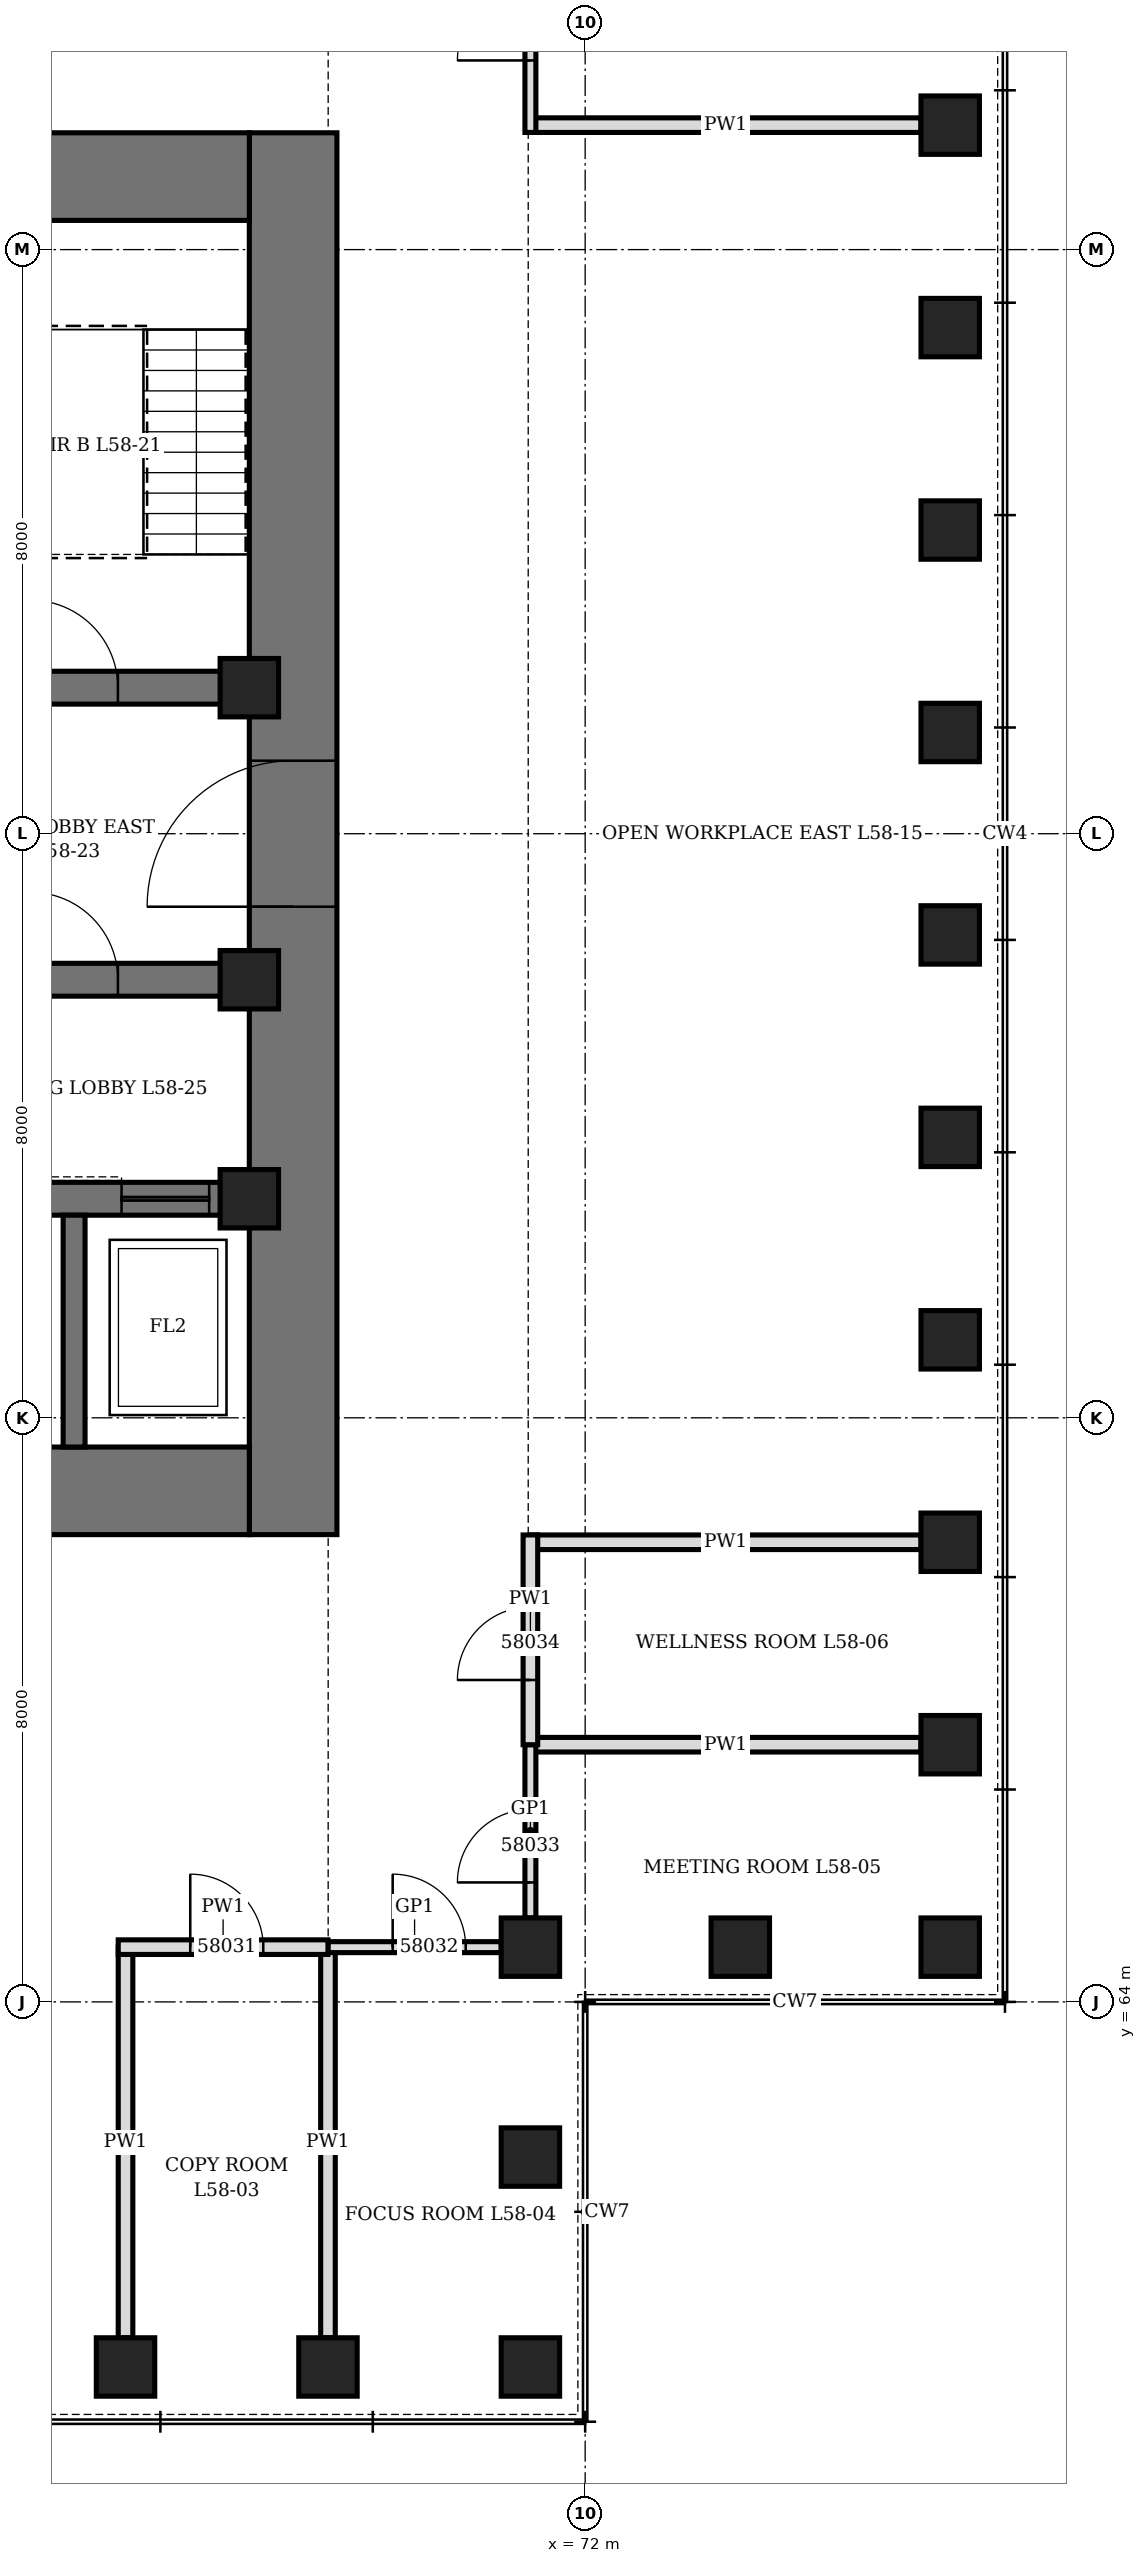
"""IFC4 building model, lengths in metres.
Left out: names, types, materials, properties, quantities, classifications, styles, units other than length and angle.
Written with IfcOpenShell. Run it as: python <this file> out.ifc"""

import sys

from ifc_helpers import new_model, si_unit, direction, frame, frame_2d, origin, origin_2d, place, context, subcontext, project, spatial, rectangle, hollow_rectangle, extrude, element, fill, save


model = new_model("IFC4")
c1 = context("Model", 3, precision=1e-05, world=origin(), true_north=direction((0.0, 1.0)))
c2 = subcontext(c1, "Body", "Model", "MODEL_VIEW")
j1 = project(units=[si_unit("LENGTHUNIT", "METRE"), si_unit("PLANEANGLEUNIT", "RADIAN")], contexts=[c1])
p1 = place(None, origin())
s1 = spatial("IfcSite", under=j1, at=p1, CompositionType="ELEMENT")
p2 = place(p1, origin())
s2 = spatial("IfcBuilding", under=s1, at=p2, CompositionType="ELEMENT")
p3 = place(p2, frame((0.0, 0.0, 258.7)))
s3 = spatial("IfcBuildingStorey", under=s2, at=p3, CompositionType="ELEMENT", Elevation=258.7)
for number, where, z_axis, x_axis in (
    (1, (65.705, 59.0, 0.0), (0.0, 0.0, 1.0), (1.0, 0.0, 0.0)),
    (2, (68.477, 59.0, 0.0), (0.0, 0.0, 1.0), (1.0, 0.0, 0.0)),
    (3, (71.25, 59.0, 0.0), (0.0, 0.0, 1.0), (0.0, 1.0, 0.0)),
    (4, (71.25, 61.875, 0.0), (0.0, 0.0, 1.0), (0.0, 1.0, 0.0)),
    (5, (71.25, 64.75, 0.0), (0.0, 0.0, 1.0), (1.0, 0.0, 0.0)),
    (6, (74.125, 64.75, 0.0), (0.0, 0.0, 1.0), (1.0, 0.0, 0.0)),
    (7, (77.0, 64.75, 0.0), (0.0, 0.0, 1.0), (0.0, 1.0, 0.0)),
    (8, (77.0, 67.523, 0.0), (0.0, 0.0, 1.0), (0.0, 1.0, 0.0)),
    (9, (77.0, 70.295, 0.0), (0.0, 0.0, 1.0), (0.0, 1.0, 0.0)),
    (10, (77.0, 73.068, 0.0), (0.0, 0.0, 1.0), (0.0, 1.0, 0.0)),
    (11, (77.0, 75.841, 0.0), (0.0, 0.0, 1.0), (0.0, 1.0, 0.0)),
    (12, (77.0, 78.614, 0.0), (0.0, 0.0, 1.0), (0.0, 1.0, 0.0)),
    (13, (77.0, 81.386, 0.0), (0.0, 0.0, 1.0), (0.0, 1.0, 0.0)),
    (14, (77.0, 84.159, 0.0), (0.0, 0.0, 1.0), (0.0, 1.0, 0.0)),
    (15, (77.0, 86.932, 0.0), (0.0, 0.0, 1.0), (0.0, 1.0, 0.0)),
    (16, (77.0, 89.705, 0.0), (0.0, 0.0, 1.0), (0.0, 1.0, 0.0)),
):
    element("IfcColumn", number, at=place(p3, frame(where, z_axis=z_axis, x_axis=x_axis)), inside=s3, PredefinedType="COLUMN", context=c2, shape_type="SweptSolid", body=[
        extrude(hollow_rectangle(XDim=0.8, YDim=0.8, WallThickness=0.1, at=origin_2d()), origin(), (0.0, 0.0, 1.0), 4.2),
    ])
p4 = place(p3, frame((68.0, 70.4, 0.0), z_axis=(0.0, 0.0, 1.0), x_axis=(0.0, 1.0, 0.0)))
e17 = element("IfcWall", 17, at=p4, inside=s3, PredefinedType="SHEAR", context=c2, shape_type="SweptSolid", body=[
    extrude(rectangle(XDim=19.2, YDim=1.2, at=frame_2d((9.6, 0.0))), origin(), (0.0, 0.0, 1.0), 4.2),
])
p5 = place(p4, frame((8.6, 0.0, 0.0)))
e18 = element("IfcOpeningElement", 18, at=p5, cuts=e17, PredefinedType="OPENING", context=c2, shape_type="SweptSolid", body=[
    extrude(rectangle(XDim=2.0, YDim=2.4, at=frame_2d((1.0, 1.2))), frame((0.0, 0.61, 0.0), z_axis=(0.0, -1.0, 0.0), x_axis=(1.0, 0.0, 0.0)), (0.0, 0.0, 1.0), 1.22),
])
p6 = place(p3, frame((44.6, 71.0, 0.0), z_axis=(0.0, 0.0, 1.0), x_axis=(1.0, 0.0, 0.0)))
e19 = element("IfcWall", 19, at=p6, inside=s3, PredefinedType="SHEAR", context=c2, shape_type="SweptSolid", body=[
    extrude(rectangle(XDim=22.8, YDim=1.2, at=frame_2d((11.4, 0.0))), origin(), (0.0, 0.0, 1.0), 4.2),
])
p7 = place(p6, frame((6.35, 0.0, 0.0)))
e20 = element("IfcOpeningElement", 20, at=p7, cuts=e19, PredefinedType="OPENING", context=c2, shape_type="SweptSolid", body=[
    extrude(rectangle(XDim=1.1, YDim=2.2, at=frame_2d((0.55, 1.1))), frame((0.0, 0.61, 0.0), z_axis=(0.0, -1.0, 0.0), x_axis=(1.0, 0.0, 0.0)), (0.0, 0.0, 1.0), 1.22),
])
p8 = place(p6, frame((9.35, 0.0, 0.0)))
e21 = element("IfcOpeningElement", 21, at=p8, cuts=e19, PredefinedType="OPENING", context=c2, shape_type="SweptSolid", body=[
    extrude(rectangle(XDim=1.1, YDim=2.2, at=frame_2d((0.55, 1.1))), frame((0.0, 0.61, 0.0), z_axis=(0.0, -1.0, 0.0), x_axis=(1.0, 0.0, 0.0)), (0.0, 0.0, 1.0), 1.22),
])
p9 = place(p6, frame((12.35, 0.0, 0.0)))
e22 = element("IfcOpeningElement", 22, at=p9, cuts=e19, PredefinedType="OPENING", context=c2, shape_type="SweptSolid", body=[
    extrude(rectangle(XDim=1.1, YDim=2.2, at=frame_2d((0.55, 1.1))), frame((0.0, 0.61, 0.0), z_axis=(0.0, -1.0, 0.0), x_axis=(1.0, 0.0, 0.0)), (0.0, 0.0, 1.0), 1.22),
])
p10 = place(p6, frame((15.35, 0.0, 0.0)))
e23 = element("IfcOpeningElement", 23, at=p10, cuts=e19, PredefinedType="OPENING", context=c2, shape_type="SweptSolid", body=[
    extrude(rectangle(XDim=1.1, YDim=2.2, at=frame_2d((0.55, 1.1))), frame((0.0, 0.61, 0.0), z_axis=(0.0, -1.0, 0.0), x_axis=(1.0, 0.0, 0.0)), (0.0, 0.0, 1.0), 1.22),
])
p11 = place(p3, frame((44.6, 89.0, 0.0), z_axis=(0.0, 0.0, 1.0), x_axis=(1.0, 0.0, 0.0)))
e24 = element("IfcWall", 24, at=p11, inside=s3, PredefinedType="SHEAR", context=c2, shape_type="SweptSolid", body=[
    extrude(rectangle(XDim=22.8, YDim=1.2, at=frame_2d((11.4, 0.0))), origin(), (0.0, 0.0, 1.0), 4.2),
])
p12 = place(p11, frame((7.9, 0.0, 0.0)))
e25 = element("IfcOpeningElement", 25, at=p12, cuts=e24, PredefinedType="OPENING", context=c2, shape_type="SweptSolid", body=[
    extrude(rectangle(XDim=1.0, YDim=2.1, at=frame_2d((0.5, 1.05))), frame((0.0, 0.61, 0.0), z_axis=(0.0, -1.0, 0.0), x_axis=(1.0, 0.0, 0.0)), (0.0, 0.0, 1.0), 1.22),
])
p13 = place(p11, frame((12.025, 0.0, 0.0)))
e26 = element("IfcOpeningElement", 26, at=p13, cuts=e24, PredefinedType="OPENING", context=c2, shape_type="SweptSolid", body=[
    extrude(rectangle(XDim=0.9, YDim=2.1, at=frame_2d((0.45, 1.05))), frame((0.0, 0.61, 0.0), z_axis=(0.0, -1.0, 0.0), x_axis=(1.0, 0.0, 0.0)), (0.0, 0.0, 1.0), 1.22),
])
p14 = place(p11, frame((13.962, 0.0, 0.0)))
e27 = element("IfcOpeningElement", 27, at=p14, cuts=e24, PredefinedType="OPENING", context=c2, shape_type="SweptSolid", body=[
    extrude(rectangle(XDim=0.9, YDim=2.1, at=frame_2d((0.45, 1.05))), frame((0.0, 0.61, 0.0), z_axis=(0.0, -1.0, 0.0), x_axis=(1.0, 0.0, 0.0)), (0.0, 0.0, 1.0), 1.22),
])
p15 = place(p3, frame((62.225, 75.0, 0.0), z_axis=(0.0, 0.0, 1.0), x_axis=(1.0, 0.0, 0.0)))
e28 = element("IfcWall", 28, at=p15, inside=s3, PredefinedType="SHEAR", context=c2, shape_type="SweptSolid", body=[
    extrude(rectangle(XDim=5.175, YDim=0.45, at=frame_2d((2.587, 0.0))), origin(), (0.0, 0.0, 1.0), 4.2),
])
p16 = place(p15, frame((0.675, 0.0, 0.0)))
e29 = element("IfcOpeningElement", 29, at=p16, cuts=e28, PredefinedType="OPENING", context=c2, shape_type="SweptSolid", body=[
    extrude(rectangle(XDim=1.2, YDim=2.2, at=frame_2d((0.6, 1.1))), frame((0.0, 0.235, 0.0), z_axis=(0.0, -1.0, 0.0), x_axis=(1.0, 0.0, 0.0)), (0.0, 0.0, 1.0), 0.47),
])
p17 = place(p15, frame((3.425, 0.0, 0.0)))
e30 = element("IfcOpeningElement", 30, at=p17, cuts=e28, PredefinedType="OPENING", context=c2, shape_type="SweptSolid", body=[
    extrude(rectangle(XDim=1.2, YDim=2.2, at=frame_2d((0.6, 1.1))), frame((0.0, 0.235, 0.0), z_axis=(0.0, -1.0, 0.0), x_axis=(1.0, 0.0, 0.0)), (0.0, 0.0, 1.0), 0.47),
])
p18 = place(p3, frame((62.225, 78.0, 0.0), z_axis=(0.0, 0.0, 1.0), x_axis=(1.0, 0.0, 0.0)))
e31 = element("IfcWall", 31, at=p18, inside=s3, PredefinedType="SHEAR", context=c2, shape_type="SweptSolid", body=[
    extrude(rectangle(XDim=5.175, YDim=0.45, at=frame_2d((2.587, 0.0))), origin(), (0.0, 0.0, 1.0), 4.2),
])
p19 = place(p18, frame((2.175, 0.0, 0.0)))
e32 = element("IfcOpeningElement", 32, at=p19, cuts=e31, PredefinedType="OPENING", context=c2, shape_type="SweptSolid", body=[
    extrude(rectangle(XDim=1.2, YDim=2.1, at=frame_2d((0.6, 1.05))), frame((0.0, 0.235, 0.0), z_axis=(0.0, -1.0, 0.0), x_axis=(1.0, 0.0, 0.0)), (0.0, 0.0, 1.0), 0.47),
])
p20 = place(p3, frame((62.225, 82.0, 0.0), z_axis=(0.0, 0.0, 1.0), x_axis=(1.0, 0.0, 0.0)))
e33 = element("IfcWall", 33, at=p20, inside=s3, PredefinedType="SHEAR", context=c2, shape_type="SweptSolid", body=[
    extrude(rectangle(XDim=5.175, YDim=0.45, at=frame_2d((2.587, 0.0))), origin(), (0.0, 0.0, 1.0), 4.2),
])
p21 = place(p20, frame((2.175, 0.0, 0.0)))
e34 = element("IfcOpeningElement", 34, at=p21, cuts=e33, PredefinedType="OPENING", context=c2, shape_type="SweptSolid", body=[
    extrude(rectangle(XDim=1.2, YDim=2.1, at=frame_2d((0.6, 1.05))), frame((0.0, 0.235, 0.0), z_axis=(0.0, -1.0, 0.0), x_axis=(1.0, 0.0, 0.0)), (0.0, 0.0, 1.0), 0.47),
])
p22 = place(p3, frame((65.0, 71.6, 0.0), z_axis=(0.0, 0.0, 1.0), x_axis=(0.0, 1.0, 0.0)))
e35 = element("IfcWall", 35, at=p22, inside=s3, PredefinedType="SHEAR", context=c2, shape_type="SweptSolid", body=[
    extrude(rectangle(XDim=3.175, YDim=0.3, at=frame_2d((1.587, 0.0))), origin(), (0.0, 0.0, 1.0), 4.2),
])
for number, where, z_axis, x_axis in (
    (36, (67.4, 75.0, 0.0), (0.0, 0.0, 1.0), (1.0, 0.0, 0.0)),
    (37, (67.4, 78.0, 0.0), (0.0, 0.0, 1.0), (1.0, 0.0, 0.0)),
    (38, (67.4, 82.0, 0.0), (0.0, 0.0, 1.0), (1.0, 0.0, 0.0)),
):
    element("IfcColumn", number, at=place(p3, frame(where, z_axis=z_axis, x_axis=x_axis)), inside=s3, PredefinedType="COLUMN", context=c2, shape_type="SweptSolid", body=[
        extrude(hollow_rectangle(XDim=0.8, YDim=0.8, WallThickness=0.1, at=origin_2d()), origin(), (0.0, 0.0, 1.0), 4.2),
    ])
for number, where, z_axis, x_axis in (
    (39, (65.705, 59.4, 0.0), (0.0, 0.0, 1.0), (0.0, 1.0, 0.0)),
    (40, (68.477, 59.4, 0.0), (0.0, 0.0, 1.0), (0.0, 1.0, 0.0)),
    (41, (71.25, 67.523, 0.0), (0.0, 0.0, 1.0), (1.0, 0.0, 0.0)),
    (42, (71.25, 70.295, 0.0), (0.0, 0.0, 1.0), (1.0, 0.0, 0.0)),
    (43, (71.25, 89.705, 0.0), (0.0, 0.0, 1.0), (1.0, 0.0, 0.0)),
):
    element("IfcWall", number, at=place(p3, frame(where, z_axis=z_axis, x_axis=x_axis)), inside=s3, PredefinedType="PARTITIONING", context=c2, shape_type="SweptSolid", body=[
        extrude(rectangle(XDim=5.35, YDim=0.2, at=frame_2d((2.675, 0.0))), origin(), (0.0, 0.0, 1.0), 3.428),
    ])
p23 = place(p3, frame((68.477, 64.75, 0.0), z_axis=(0.0, 0.0, 1.0), x_axis=(1.0, 0.0, 0.0)))
e44 = element("IfcWall", 44, at=p23, inside=s3, PredefinedType="PARTITIONING", context=c2, shape_type="SweptSolid", body=[
    extrude(rectangle(XDim=2.373, YDim=0.15, at=frame_2d((1.187, 0.0))), origin(), (0.0, 0.0, 1.0), 4.04),
])
p24 = place(p23, frame((0.886, 0.0, 0.0)))
e45 = element("IfcOpeningElement", 45, at=p24, cuts=e44, PredefinedType="OPENING", context=c2, shape_type="SweptSolid", body=[
    extrude(rectangle(XDim=1.0, YDim=2.4, at=frame_2d((0.5, 1.2))), frame((0.0, 0.085, 0.0), z_axis=(0.0, -1.0, 0.0), x_axis=(1.0, 0.0, 0.0)), (0.0, 0.0, 1.0), 0.17),
])
p25 = place(p3, frame((65.604, 64.75, 0.0), z_axis=(0.0, 0.0, 1.0), x_axis=(1.0, 0.0, 0.0)))
e46 = element("IfcWall", 46, at=p25, inside=s3, PredefinedType="PARTITIONING", context=c2, shape_type="SweptSolid", body=[
    extrude(rectangle(XDim=2.873, YDim=0.2, at=frame_2d((1.437, 0.0))), origin(), (0.0, 0.0, 1.0), 4.04),
])
p26 = place(p25, frame((0.986, 0.0, 0.0)))
e47 = element("IfcOpeningElement", 47, at=p26, cuts=e46, PredefinedType="OPENING", context=c2, shape_type="SweptSolid", body=[
    extrude(rectangle(XDim=1.0, YDim=2.1, at=frame_2d((0.5, 1.05))), frame((0.0, 0.11, 0.0), z_axis=(0.0, -1.0, 0.0), x_axis=(1.0, 0.0, 0.0)), (0.0, 0.0, 1.0), 0.22),
])
p27 = place(p3, frame((71.25, 65.15, 0.0), z_axis=(0.0, 0.0, 1.0), x_axis=(0.0, 1.0, 0.0)))
e48 = element("IfcWall", 48, at=p27, inside=s3, PredefinedType="PARTITIONING", context=c2, shape_type="SweptSolid", body=[
    extrude(rectangle(XDim=2.373, YDim=0.15, at=frame_2d((1.187, 0.0))), origin(), (0.0, 0.0, 1.0), 4.04),
])
p28 = place(p27, frame((0.486, 0.0, 0.0)))
e49 = element("IfcOpeningElement", 49, at=p28, cuts=e48, PredefinedType="OPENING", context=c2, shape_type="SweptSolid", body=[
    extrude(rectangle(XDim=1.0, YDim=2.4, at=frame_2d((0.5, 1.2))), frame((0.0, 0.085, 0.0), z_axis=(0.0, -1.0, 0.0), x_axis=(1.0, 0.0, 0.0)), (0.0, 0.0, 1.0), 0.17),
])
p29 = place(p3, frame((71.25, 89.604, 0.0), z_axis=(0.0, 0.0, 1.0), x_axis=(0.0, 1.0, 0.0)))
e50 = element("IfcWall", 50, at=p29, inside=s3, PredefinedType="PARTITIONING", context=c2, shape_type="SweptSolid", body=[
    extrude(rectangle(XDim=5.246, YDim=0.15, at=frame_2d((2.623, 0.0))), origin(), (0.0, 0.0, 1.0), 4.04),
])
p30 = place(p29, frame((0.986, 0.0, 0.0)))
e51 = element("IfcOpeningElement", 51, at=p30, cuts=e50, PredefinedType="OPENING", context=c2, shape_type="SweptSolid", body=[
    extrude(rectangle(XDim=1.0, YDim=2.4, at=frame_2d((0.5, 1.2))), frame((0.0, 0.085, 0.0), z_axis=(0.0, -1.0, 0.0), x_axis=(1.0, 0.0, 0.0)), (0.0, 0.0, 1.0), 0.17),
])
p31 = place(p3, frame((71.25, 67.523, 0.0), z_axis=(0.0, 0.0, 1.0), x_axis=(0.0, 1.0, 0.0)))
e52 = element("IfcWall", 52, at=p31, inside=s3, PredefinedType="PARTITIONING", context=c2, shape_type="SweptSolid", body=[
    extrude(rectangle(XDim=2.873, YDim=0.2, at=frame_2d((1.437, 0.0))), origin(), (0.0, 0.0, 1.0), 4.04),
])
p32 = place(p31, frame((0.886, 0.0, 0.0)))
e53 = element("IfcOpeningElement", 53, at=p32, cuts=e52, PredefinedType="OPENING", context=c2, shape_type="SweptSolid", body=[
    extrude(rectangle(XDim=1.0, YDim=2.1, at=frame_2d((0.5, 1.05))), frame((0.0, 0.11, 0.0), z_axis=(0.0, -1.0, 0.0), x_axis=(1.0, 0.0, 0.0)), (0.0, 0.0, 1.0), 0.22),
])
p33 = place(p21, origin())
e54 = element("IfcDoor", 54, at=p33, inside=s3, OperationType="SINGLE_SWING_LEFT", PredefinedType="DOOR", context=c2, shape_type="SweptSolid", body=[
    extrude(rectangle(XDim=1.2, YDim=2.1, at=frame_2d((0.6, 1.05))), frame((0.0, 0.225, 0.0), z_axis=(0.0, -1.0, 0.0), x_axis=(1.0, 0.0, 0.0)), (0.0, 0.0, 1.0), 0.449),
])
fill(e34, e54)
p34 = place(p5, origin())
e55 = element("IfcDoor", 55, at=p34, inside=s3, OperationType="DOUBLE_DOOR_SINGLE_SWING", PredefinedType="DOOR", context=c2, shape_type="SweptSolid", body=[
    extrude(rectangle(XDim=2.0, YDim=2.4, at=frame_2d((1.0, 1.2))), frame((0.0, 0.35, 0.0), z_axis=(0.0, -1.0, 0.0), x_axis=(1.0, 0.0, 0.0)), (0.0, 0.0, 1.0), 0.7),
])
fill(e18, e55)
p35 = place(p19, origin())
e56 = element("IfcDoor", 56, at=p35, inside=s3, OperationType="SINGLE_SWING_RIGHT", PredefinedType="DOOR", context=c2, shape_type="SweptSolid", body=[
    extrude(rectangle(XDim=1.2, YDim=2.1, at=frame_2d((0.6, 1.05))), frame((0.0, 0.225, 0.0), z_axis=(0.0, -1.0, 0.0), x_axis=(1.0, 0.0, 0.0)), (0.0, 0.0, 1.0), 0.449),
])
fill(e32, e56)
p36 = place(p17, origin())
e57 = element("IfcDoor", 57, at=p36, inside=s3, OperationType="SLIDING_TO_LEFT", PredefinedType="DOOR", context=c2, shape_type="SweptSolid", body=[
    extrude(rectangle(XDim=1.2, YDim=2.2, at=frame_2d((0.6, 1.1))), frame((0.0, 0.225, 0.0), z_axis=(0.0, -1.0, 0.0), x_axis=(1.0, 0.0, 0.0)), (0.0, 0.0, 1.0), 0.449),
])
fill(e30, e57)
p37 = place(p26, origin())
e58 = element("IfcDoor", 58, at=p37, inside=s3, OperationType="SINGLE_SWING_LEFT", PredefinedType="DOOR", context=c2, shape_type="SweptSolid", body=[
    extrude(rectangle(XDim=1.0, YDim=2.1, at=frame_2d((0.5, 1.05))), frame((0.0, 0.1, 0.0), z_axis=(0.0, -1.0, 0.0), x_axis=(1.0, 0.0, 0.0)), (0.0, 0.0, 1.0), 0.199),
])
fill(e47, e58)
p38 = place(p24, origin())
e59 = element("IfcDoor", 59, at=p38, inside=s3, OperationType="SINGLE_SWING_RIGHT", PredefinedType="DOOR", context=c2, shape_type="SweptSolid", body=[
    extrude(rectangle(XDim=1.0, YDim=2.4, at=frame_2d((0.5, 1.2))), frame((0.0, 0.075, 0.0), z_axis=(0.0, -1.0, 0.0), x_axis=(1.0, 0.0, 0.0)), (0.0, 0.0, 1.0), 0.149),
])
fill(e45, e59)
p39 = place(p28, origin())
e60 = element("IfcDoor", 60, at=p39, inside=s3, OperationType="SINGLE_SWING_RIGHT", PredefinedType="DOOR", context=c2, shape_type="SweptSolid", body=[
    extrude(rectangle(XDim=1.0, YDim=2.4, at=frame_2d((0.5, 1.2))), frame((0.0, 0.075, 0.0), z_axis=(0.0, -1.0, 0.0), x_axis=(1.0, 0.0, 0.0)), (0.0, 0.0, 1.0), 0.149),
])
fill(e49, e60)
p40 = place(p32, origin())
e61 = element("IfcDoor", 61, at=p40, inside=s3, OperationType="SINGLE_SWING_LEFT", PredefinedType="DOOR", context=c2, shape_type="SweptSolid", body=[
    extrude(rectangle(XDim=1.0, YDim=2.1, at=frame_2d((0.5, 1.05))), frame((0.0, 0.1, 0.0), z_axis=(0.0, -1.0, 0.0), x_axis=(1.0, 0.0, 0.0)), (0.0, 0.0, 1.0), 0.199),
])
fill(e53, e61)
p41 = place(p30, origin())
e62 = element("IfcDoor", 62, at=p41, inside=s3, OperationType="SINGLE_SWING_RIGHT", PredefinedType="DOOR", context=c2, shape_type="SweptSolid", body=[
    extrude(rectangle(XDim=1.0, YDim=2.4, at=frame_2d((0.5, 1.2))), frame((0.0, 0.075, 0.0), z_axis=(0.0, -1.0, 0.0), x_axis=(1.0, 0.0, 0.0)), (0.0, 0.0, 1.0), 0.149),
])
fill(e51, e62)
save(model, sys.argv[1])
